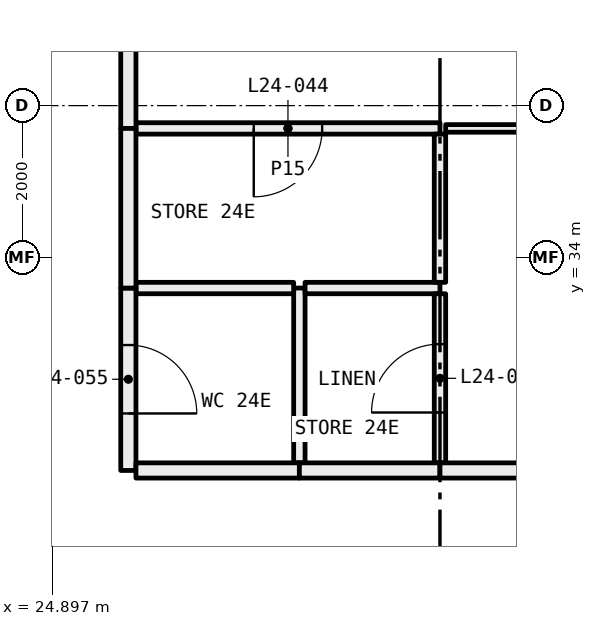
"""IFC4 building model, lengths in metres.
Left out: names, types, materials, properties, quantities, classifications, styles, units other than length and angle.
Written with IfcOpenShell. Run it as: python <this file> out.ifc"""

import sys

from ifc_helpers import new_model, si_unit, direction, frame, frame_2d, origin, place, context, subcontext, project, spatial, rectangle, extrude, element, fill, save


model = new_model("IFC4")
c1 = context("Model", 3, precision=1e-05, world=origin(), true_north=direction((0.0, 1.0)))
c2 = subcontext(c1, "Body", "Model", "MODEL_VIEW")
j1 = project(units=[si_unit("LENGTHUNIT", "METRE"), si_unit("PLANEANGLEUNIT", "RADIAN")], contexts=[c1])
p1 = place(None, origin())
s1 = spatial("IfcSite", under=j1, at=p1, CompositionType="ELEMENT")
p2 = place(p1, origin())
s2 = spatial("IfcBuilding", under=s1, at=p2, CompositionType="ELEMENT")
p3 = place(p2, frame((0.0, 0.0, 96.6)))
s3 = spatial("IfcBuildingStorey", under=s2, at=p3, CompositionType="ELEMENT", Elevation=96.6)
p4 = place(p3, frame((26.0, 35.7, 0.0), z_axis=(0.0, 0.0, 1.0), x_axis=(1.0, 0.0, 0.0)))
e1 = element("IfcWall", 1, at=p4, inside=s3, PredefinedType="PARTITIONING", context=c2, shape_type="SweptSolid", body=[
    extrude(rectangle(XDim=4.0, YDim=0.15, at=frame_2d((2.0, 0.0))), origin(), (0.0, 0.0, 1.0), 3.05),
])
p5 = place(p4, frame((1.55, 0.0, 0.0)))
e2 = element("IfcOpeningElement", 2, at=p5, cuts=e1, PredefinedType="OPENING", context=c2, shape_type="SweptSolid", body=[
    extrude(rectangle(XDim=0.9, YDim=2.1, at=frame_2d((0.45, 1.05))), frame((0.0, 0.085, 0.0), z_axis=(0.0, -1.0, 0.0), x_axis=(1.0, 0.0, 0.0)), (0.0, 0.0, 1.0), 0.17),
])
p6 = place(p3, frame((30.075, 35.7, 0.0), z_axis=(0.0, 0.0, 1.0), x_axis=(1.0, 0.0, 0.0)))
e3 = element("IfcWall", 3, at=p6, inside=s3, PredefinedType="PARTITIONING", context=c2, shape_type="SweptSolid", body=[
    extrude(rectangle(XDim=1.375, YDim=0.1, at=frame_2d((0.688, 0.0))), origin(), (0.0, 0.0, 1.0), 3.05),
])
p7 = place(p3, frame((25.9, 41.9, 0.0), z_axis=(0.0, 0.0, 1.0), x_axis=(0.0, -1.0, 0.0)))
e4 = element("IfcWall", 4, at=p7, inside=s3, PredefinedType="PARTITIONING", context=c2, shape_type="SweptSolid", body=[
    extrude(rectangle(XDim=6.2, YDim=0.2, at=frame_2d((3.1, 0.0))), origin(), (0.0, 0.0, 1.0), 2.45),
])
p8 = place(p3, frame((28.15, 31.3, 0.0), z_axis=(0.0, 0.0, 1.0), x_axis=(0.0, 1.0, 0.0)))
e5 = element("IfcWall", 5, at=p8, inside=s3, PredefinedType="PARTITIONING", context=c2, shape_type="SweptSolid", body=[
    extrude(rectangle(XDim=2.3, YDim=0.15, at=frame_2d((1.15, 0.0))), origin(), (0.0, 0.0, 1.0), 3.05),
])
p9 = place(p3, frame((28.075, 33.6, 0.0), z_axis=(0.0, 0.0, 1.0), x_axis=(-1.0, 0.0, 0.0)))
e6 = element("IfcWall", 6, at=p9, inside=s3, PredefinedType="PARTITIONING", context=c2, shape_type="SweptSolid", body=[
    extrude(rectangle(XDim=2.075, YDim=0.15, at=frame_2d((1.038, 0.0))), origin(), (0.0, 0.0, 1.0), 3.05),
])
p10 = place(p3, frame((25.9, 33.6, 0.0), z_axis=(0.0, 0.0, 1.0), x_axis=(0.0, -1.0, 0.0)))
e7 = element("IfcWall", 7, at=p10, inside=s3, PredefinedType="PARTITIONING", context=c2, shape_type="SweptSolid", body=[
    extrude(rectangle(XDim=2.4, YDim=0.2, at=frame_2d((1.2, 0.0))), origin(), (0.0, 0.0, 1.0), 3.05),
])
p11 = place(p10, frame((0.75, 0.0, 0.0)))
e8 = element("IfcOpeningElement", 8, at=p11, cuts=e7, PredefinedType="OPENING", context=c2, shape_type="SweptSolid", body=[
    extrude(rectangle(XDim=0.9, YDim=2.1, at=frame_2d((0.45, 1.05))), frame((0.0, 0.11, 0.0), z_axis=(0.0, -1.0, 0.0), x_axis=(1.0, 0.0, 0.0)), (0.0, 0.0, 1.0), 0.22),
])
p12 = place(p3, frame((26.0, 31.2, 0.0), z_axis=(0.0, 0.0, 1.0), x_axis=(1.0, 0.0, 0.0)))
e9 = element("IfcWall", 9, at=p12, inside=s3, PredefinedType="PARTITIONING", context=c2, shape_type="SweptSolid", body=[
    extrude(rectangle(XDim=2.15, YDim=0.2, at=frame_2d((1.075, 0.0))), origin(), (0.0, 0.0, 1.0), 3.05),
])
p13 = place(p3, frame((30.0, 33.6, 0.0), z_axis=(0.0, 0.0, 1.0), x_axis=(-1.0, 0.0, 0.0)))
e10 = element("IfcWall", 10, at=p13, inside=s3, PredefinedType="PARTITIONING", context=c2, shape_type="SweptSolid", body=[
    extrude(rectangle(XDim=1.775, YDim=0.15, at=frame_2d((0.887, 0.0))), origin(), (0.0, 0.0, 1.0), 3.05),
])
p14 = place(p3, frame((30.0, 31.3, 0.0), z_axis=(0.0, 0.0, 1.0), x_axis=(0.0, 1.0, 0.0)))
e11 = element("IfcWall", 11, at=p14, inside=s3, PredefinedType="PARTITIONING", context=c2, shape_type="SweptSolid", body=[
    extrude(rectangle(XDim=2.225, YDim=0.15, at=frame_2d((1.112, 0.0))), origin(), (0.0, 0.0, 1.0), 3.05),
])
p15 = place(p14, frame((0.663, 0.0, 0.0)))
e12 = element("IfcOpeningElement", 12, at=p15, cuts=e11, PredefinedType="OPENING", context=c2, shape_type="SweptSolid", body=[
    extrude(rectangle(XDim=0.9, YDim=2.1, at=frame_2d((0.45, 1.05))), frame((0.0, 0.085, 0.0), z_axis=(0.0, -1.0, 0.0), x_axis=(1.0, 0.0, 0.0)), (0.0, 0.0, 1.0), 0.17),
])
p16 = place(p3, frame((28.15, 31.2, 0.0), z_axis=(0.0, 0.0, 1.0), x_axis=(1.0, 0.0, 0.0)))
e13 = element("IfcWall", 13, at=p16, inside=s3, PredefinedType="PARTITIONING", context=c2, shape_type="SweptSolid", body=[
    extrude(rectangle(XDim=1.85, YDim=0.2, at=frame_2d((0.925, 0.0))), origin(), (0.0, 0.0, 1.0), 3.05),
])
p17 = place(p3, frame((30.0, 33.675, 0.0), z_axis=(0.0, 0.0, 1.0), x_axis=(0.0, 1.0, 0.0)))
e14 = element("IfcWall", 14, at=p17, inside=s3, PredefinedType="PARTITIONING", context=c2, shape_type="SweptSolid", body=[
    extrude(rectangle(XDim=1.95, YDim=0.15, at=frame_2d((0.975, 0.0))), origin(), (0.0, 0.0, 1.0), 3.05),
])
p18 = place(p3, frame((25.9, 35.7, 0.0), z_axis=(0.0, 0.0, 1.0), x_axis=(0.0, -1.0, 0.0)))
e15 = element("IfcWall", 15, at=p18, inside=s3, PredefinedType="PARTITIONING", context=c2, shape_type="SweptSolid", body=[
    extrude(rectangle(XDim=2.1, YDim=0.2, at=frame_2d((1.05, 0.0))), origin(), (0.0, 0.0, 1.0), 3.05),
])
p19 = place(p3, frame((30.0, 31.2, 0.0), z_axis=(0.0, 0.0, 1.0), x_axis=(1.0, 0.0, 0.0)))
e16 = element("IfcWall", 16, at=p19, inside=s3, PredefinedType="PARTITIONING", context=c2, shape_type="SweptSolid", body=[
    extrude(rectangle(XDim=6.0, YDim=0.2, at=frame_2d((3.0, 0.0))), origin(), (0.0, 0.0, 1.0), 2.45),
])
p20 = place(p5, frame((0.9, 0.0, 0.0), x_axis=(-1.0, 0.0, 0.0)))
e17 = element("IfcDoor", 17, at=p20, inside=s3, OperationType="SINGLE_SWING_LEFT", PredefinedType="DOOR", context=c2, shape_type="SweptSolid", body=[
    extrude(rectangle(XDim=0.9, YDim=2.1, at=frame_2d((0.45, 1.05))), frame((0.0, 0.025, 0.0), z_axis=(0.0, -1.0, 0.0), x_axis=(1.0, 0.0, 0.0)), (0.0, 0.0, 1.0), 0.05),
])
fill(e2, e17)
p21 = place(p15, origin())
e18 = element("IfcDoor", 18, at=p21, inside=s3, OperationType="SINGLE_SWING_RIGHT", PredefinedType="DOOR", context=c2, shape_type="SweptSolid", body=[
    extrude(rectangle(XDim=0.9, YDim=2.1, at=frame_2d((0.45, 1.05))), frame((0.0, 0.025, 0.0), z_axis=(0.0, -1.0, 0.0), x_axis=(1.0, 0.0, 0.0)), (0.0, 0.0, 1.0), 0.05),
])
fill(e12, e18)
p22 = place(p11, origin())
e19 = element("IfcDoor", 19, at=p22, inside=s3, OperationType="SINGLE_SWING_LEFT", PredefinedType="DOOR", context=c2, shape_type="SweptSolid", body=[
    extrude(rectangle(XDim=0.9, YDim=2.1, at=frame_2d((0.45, 1.05))), frame((0.0, 0.025, 0.0), z_axis=(0.0, -1.0, 0.0), x_axis=(1.0, 0.0, 0.0)), (0.0, 0.0, 1.0), 0.05),
])
fill(e8, e19)
save(model, sys.argv[1])
